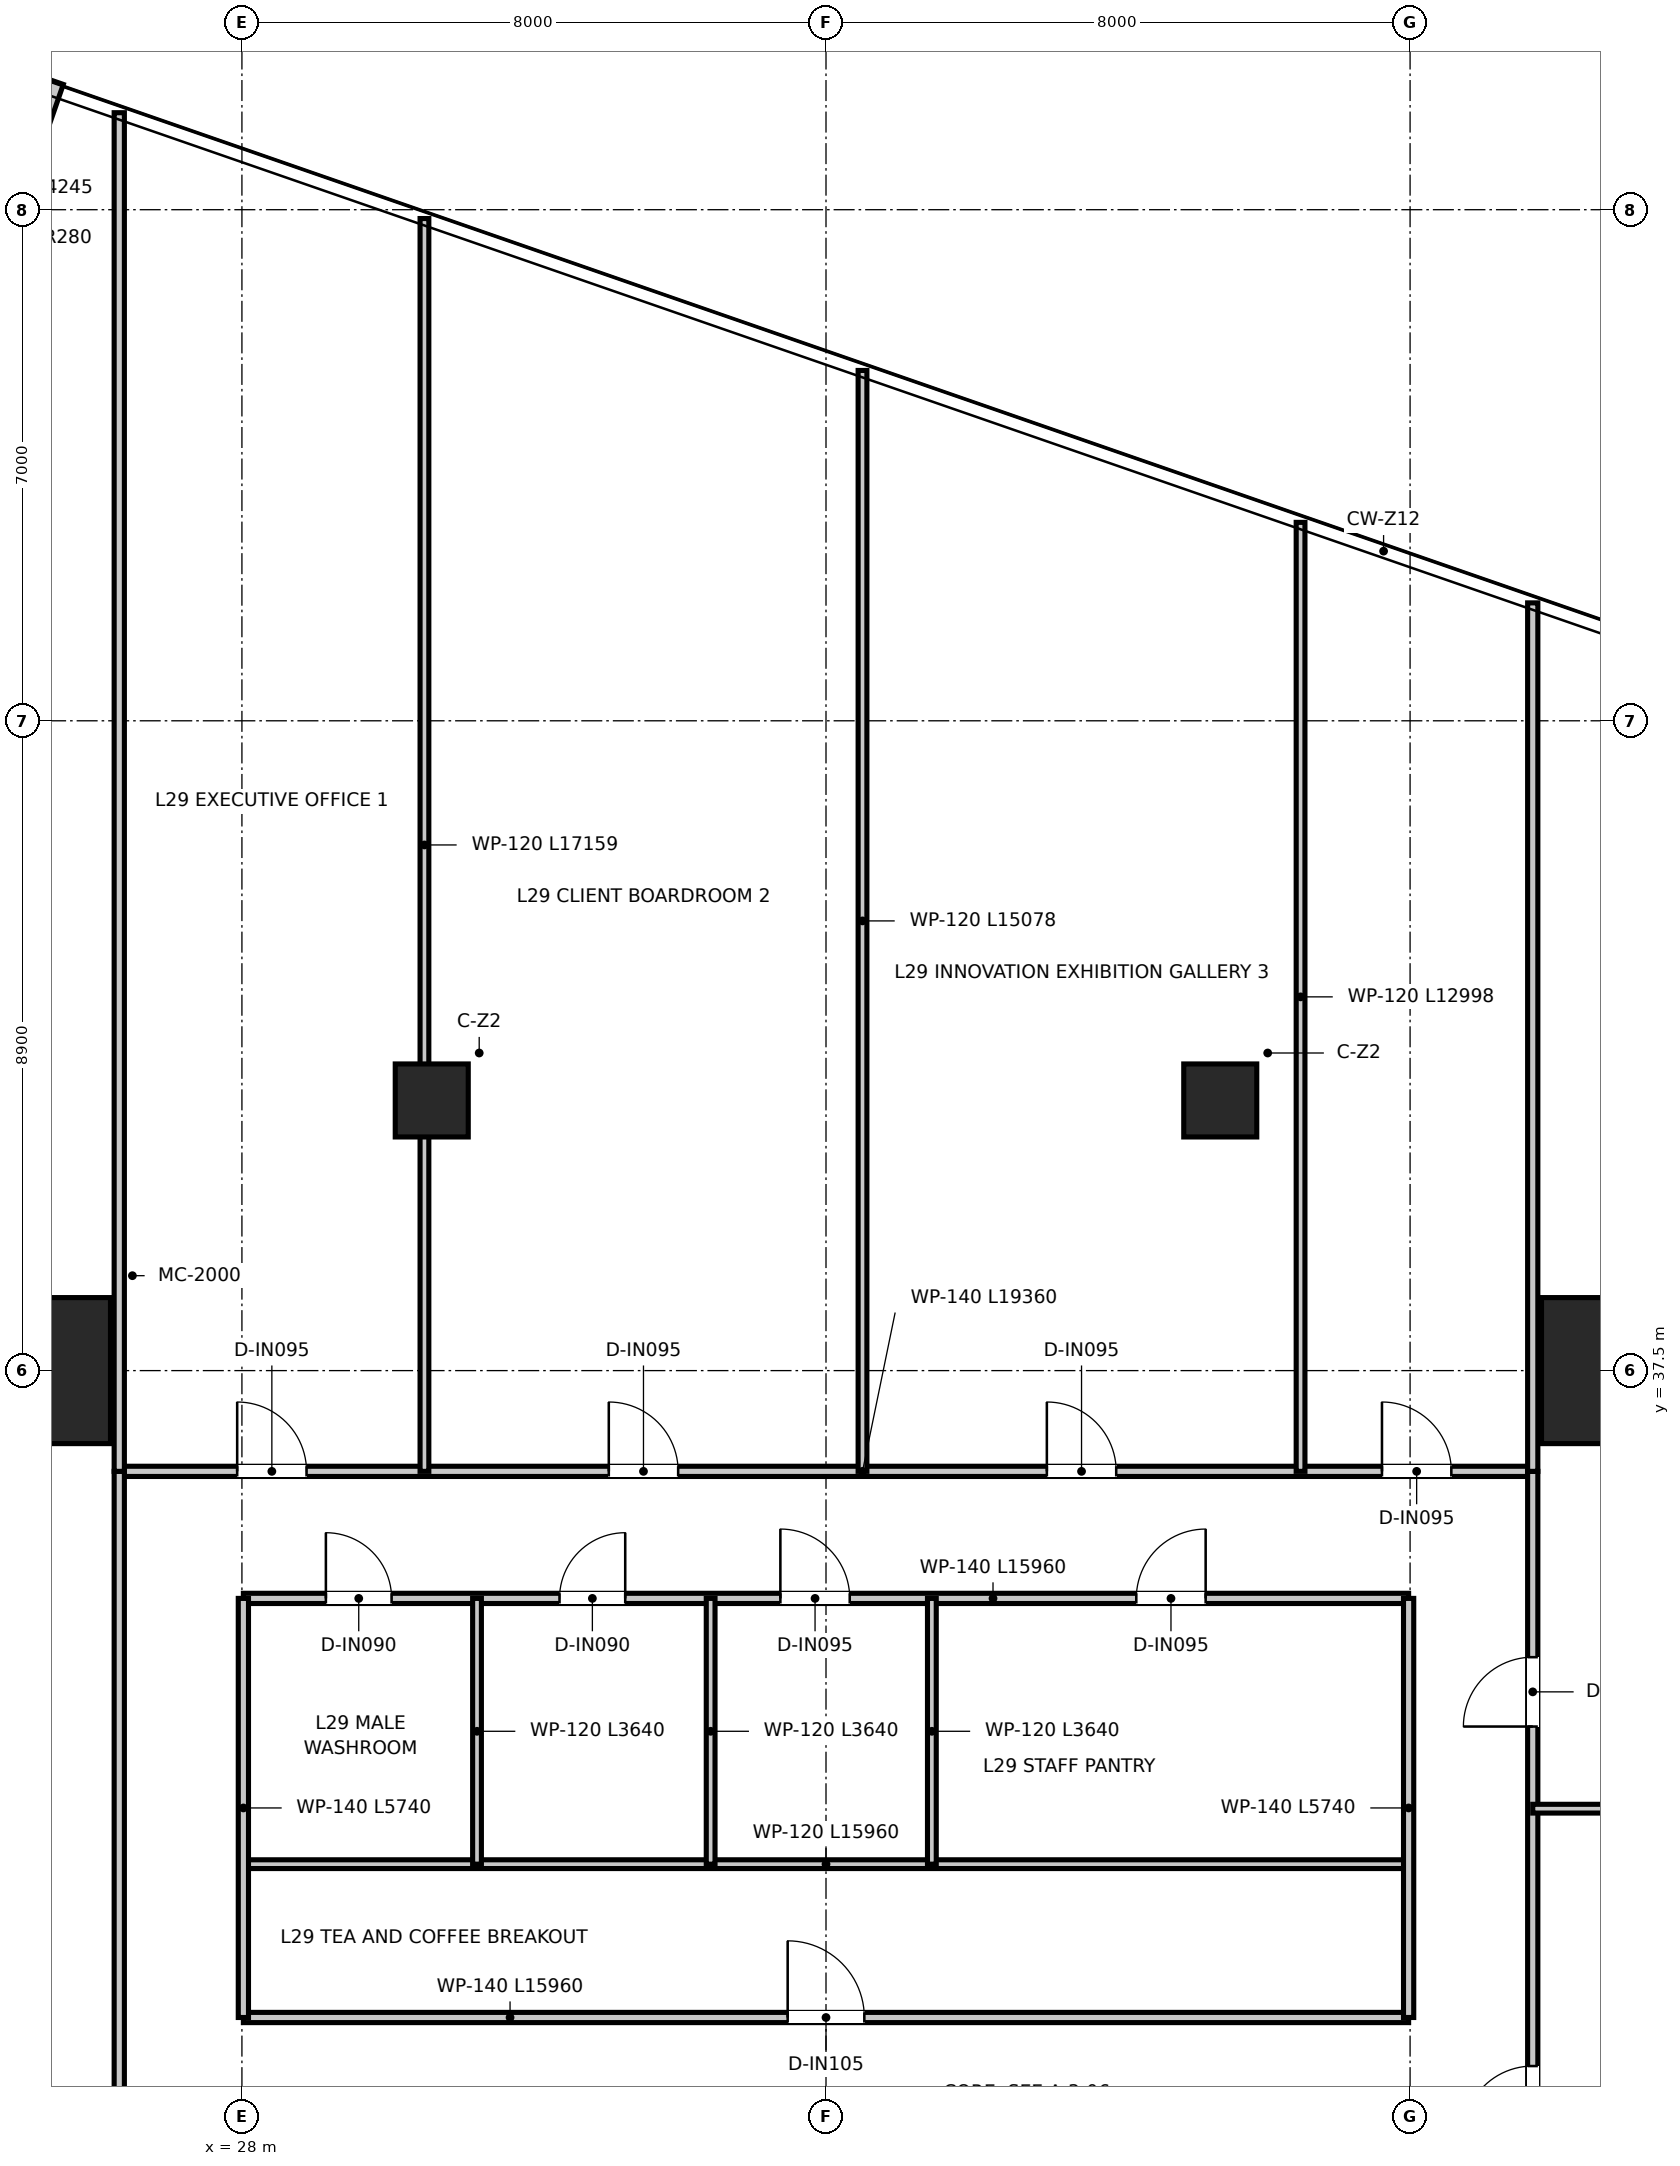
"""IFC4 building model, lengths in metres.
Left out: names, types, materials, properties, quantities, classifications, styles, units other than length and angle.
Written with IfcOpenShell. Run it as: python <this file> out.ifc"""

import sys

from ifc_helpers import new_model, si_unit, direction, frame, frame_2d, origin, origin_2d, place, context, subcontext, project, spatial, rectangle, extrude, source, transform, mapped, element, fill, save


model = new_model("IFC4")
c1 = context("Model", 3, precision=1e-05, world=origin(), true_north=direction((0.0, 1.0)))
c2 = subcontext(c1, "Body", "Model", "MODEL_VIEW")
j1 = project(units=[si_unit("LENGTHUNIT", "METRE"), si_unit("PLANEANGLEUNIT", "RADIAN")], contexts=[c1])
p1 = place(None, origin())
s1 = spatial("IfcSite", under=j1, at=p1, CompositionType="ELEMENT")
p2 = place(p1, origin())
s2 = spatial("IfcBuilding", under=s1, at=p2, CompositionType="ELEMENT")
p3 = place(p2, frame((0.0, 0.0, 121.65)))
s3 = spatial("IfcBuildingStorey", under=s2, at=p3, CompositionType="ELEMENT", Elevation=121.65)
m1 = source(origin(), c2, "Body", "SweptSolid", [
    extrude(rectangle(XDim=2.0, YDim=2.0, at=origin_2d()), origin(), (0.0, 0.0, 1.0), 3.95),
])
for number, where, z_axis, x_axis in (
    (1, (46.8, 37.5, 0.0), (0.0, 0.0, 1.0), (1.0, 0.0, 0.0)),
    (2, (25.2, 37.5, 0.0), (0.0, 0.0, 1.0), (1.0, 0.0, 0.0)),
):
    element("IfcColumn", number, at=place(p3, frame(where, z_axis=z_axis, x_axis=x_axis)), inside=s3, PredefinedType="USERDEFINED", context=c2, shape_type="MappedRepresentation", body=[
        mapped(m1, transform((0.0, 0.0, 0.0), x_axis=(1.0, 0.0, 0.0), y_axis=(0.0, 1.0, 0.0), z_axis=(0.0, 0.0, 1.0), scale=1.0)),
    ])
m2 = source(origin(), c2, "Body", "SweptSolid", [
    extrude(rectangle(XDim=1.0, YDim=1.0, at=origin_2d()), origin(), (0.0, 0.0, 1.0), 3.95),
])
for number, where, z_axis, x_axis in (
    (3, (30.6, 41.2, 0.0), (0.0, 0.0, 1.0), (1.0, 0.0, 0.0)),
    (4, (41.4, 41.2, 0.0), (0.0, 0.0, 1.0), (1.0, 0.0, 0.0)),
):
    element("IfcColumn", number, at=place(p3, frame(where, z_axis=z_axis, x_axis=x_axis)), inside=s3, PredefinedType="COLUMN", context=c2, shape_type="MappedRepresentation", body=[
        mapped(m2, transform((0.0, 0.0, 0.0), x_axis=(1.0, 0.0, 0.0), y_axis=(0.0, 1.0, 0.0), z_axis=(0.0, 0.0, 1.0), scale=1.0)),
    ])
p4 = place(p3, frame((25.449, 55.152, 0.0), z_axis=(0.0, 0.0, 1.0), x_axis=(-0.327643843028, -0.944801308279, 0.0)))
e5 = element("IfcWall", 5, at=p4, inside=s3, PredefinedType="ELEMENTEDWALL", context=c2, shape_type="SweptSolid", body=[
    extrude(rectangle(XDim=4.245, YDim=0.22, at=frame_2d((2.123, 0.0))), origin(), (0.0, 0.0, 1.0), 3.67),
])
p5 = place(p3, frame((28.02, 28.64, 0.0), z_axis=(0.0, 0.0, 1.0), x_axis=(1.0, 0.0, 0.0)))
e6 = element("IfcWall", 6, at=p5, inside=s3, PredefinedType="PARTITIONING", context=c2, shape_type="SweptSolid", body=[
    extrude(rectangle(XDim=15.96, YDim=0.14, at=frame_2d((7.98, 0.0))), origin(), (0.0, 0.0, 1.0), 3.08),
])
p6 = place(p5, frame((7.455, 0.0, 0.0)))
e7 = element("IfcOpeningElement", 7, at=p6, cuts=e6, PredefinedType="OPENING", context=c2, shape_type="SweptSolid", body=[
    extrude(rectangle(XDim=1.05, YDim=2.15, at=frame_2d((0.525, 1.075))), frame((0.0, 0.08, 0.0), z_axis=(0.0, -1.0, 0.0), x_axis=(1.0, 0.0, 0.0)), (0.0, 0.0, 1.0), 0.16),
])
p7 = place(p3, frame((28.02, 30.74, 0.0), z_axis=(0.0, 0.0, 1.0), x_axis=(1.0, 0.0, 0.0)))
e8 = element("IfcWall", 8, at=p7, inside=s3, PredefinedType="PARTITIONING", context=c2, shape_type="SweptSolid", body=[
    extrude(rectangle(XDim=15.96, YDim=0.12, at=frame_2d((7.98, 0.0))), origin(), (0.0, 0.0, 1.0), 3.08),
])
p8 = place(p3, frame((28.02, 34.38, 0.0), z_axis=(0.0, 0.0, 1.0), x_axis=(1.0, 0.0, 0.0)))
e9 = element("IfcWall", 9, at=p8, inside=s3, PredefinedType="PARTITIONING", context=c2, shape_type="SweptSolid", body=[
    extrude(rectangle(XDim=15.96, YDim=0.14, at=frame_2d((7.98, 0.0))), origin(), (0.0, 0.0, 1.0), 3.08),
])
p9 = place(p8, frame((1.13, 0.0, 0.0)))
e10 = element("IfcOpeningElement", 10, at=p9, cuts=e9, PredefinedType="OPENING", context=c2, shape_type="SweptSolid", body=[
    extrude(rectangle(XDim=0.9, YDim=2.1, at=frame_2d((0.45, 1.05))), frame((0.0, 0.08, 0.0), z_axis=(0.0, -1.0, 0.0), x_axis=(1.0, 0.0, 0.0)), (0.0, 0.0, 1.0), 0.16),
])
p10 = place(p8, frame((4.33, 0.0, 0.0)))
e11 = element("IfcOpeningElement", 11, at=p10, cuts=e9, PredefinedType="OPENING", context=c2, shape_type="SweptSolid", body=[
    extrude(rectangle(XDim=0.9, YDim=2.1, at=frame_2d((0.45, 1.05))), frame((0.0, 0.08, 0.0), z_axis=(0.0, -1.0, 0.0), x_axis=(1.0, 0.0, 0.0)), (0.0, 0.0, 1.0), 0.16),
])
p11 = place(p8, frame((7.355, 0.0, 0.0)))
e12 = element("IfcOpeningElement", 12, at=p11, cuts=e9, PredefinedType="OPENING", context=c2, shape_type="SweptSolid", body=[
    extrude(rectangle(XDim=0.95, YDim=2.1, at=frame_2d((0.475, 1.05))), frame((0.0, 0.08, 0.0), z_axis=(0.0, -1.0, 0.0), x_axis=(1.0, 0.0, 0.0)), (0.0, 0.0, 1.0), 0.16),
])
p12 = place(p8, frame((12.23, 0.0, 0.0)))
e13 = element("IfcOpeningElement", 13, at=p12, cuts=e9, PredefinedType="OPENING", context=c2, shape_type="SweptSolid", body=[
    extrude(rectangle(XDim=0.95, YDim=2.1, at=frame_2d((0.475, 1.05))), frame((0.0, 0.08, 0.0), z_axis=(0.0, -1.0, 0.0), x_axis=(1.0, 0.0, 0.0)), (0.0, 0.0, 1.0), 0.16),
])
for number, where, z_axis, x_axis in (
    (14, (28.02, 28.64, 0.0), (0.0, 0.0, 1.0), (0.0, 1.0, 0.0)),
    (15, (43.98, 28.64, 0.0), (0.0, 0.0, 1.0), (0.0, 1.0, 0.0)),
):
    element("IfcWall", number, at=place(p3, frame(where, z_axis=z_axis, x_axis=x_axis)), inside=s3, PredefinedType="PARTITIONING", context=c2, shape_type="SweptSolid", body=[
        extrude(rectangle(XDim=5.74, YDim=0.14, at=frame_2d((2.87, 0.0))), origin(), (0.0, 0.0, 1.0), 3.27),
    ])
for number, where, z_axis, x_axis in (
    (16, (31.22, 30.74, 0.0), (0.0, 0.0, 1.0), (0.0, 1.0, 0.0)),
    (17, (34.42, 30.74, 0.0), (0.0, 0.0, 1.0), (0.0, 1.0, 0.0)),
    (18, (37.45, 30.74, 0.0), (0.0, 0.0, 1.0), (0.0, 1.0, 0.0)),
):
    element("IfcWall", number, at=place(p3, frame(where, z_axis=z_axis, x_axis=x_axis)), inside=s3, PredefinedType="PARTITIONING", context=c2, shape_type="SweptSolid", body=[
        extrude(rectangle(XDim=3.64, YDim=0.12, at=frame_2d((1.82, 0.0))), origin(), (0.0, 0.0, 1.0), 3.17),
    ])
p13 = place(p3, frame((26.32, 36.12, 0.0), z_axis=(0.0, 0.0, 1.0), x_axis=(1.0, 0.0, 0.0)))
e19 = element("IfcWall", 19, at=p13, inside=s3, PredefinedType="PARTITIONING", context=c2, shape_type="SweptSolid", body=[
    extrude(rectangle(XDim=19.36, YDim=0.14, at=frame_2d((9.68, 0.0))), origin(), (0.0, 0.0, 1.0), 3.08),
])
p14 = place(p13, frame((1.615, 0.0, 0.0)))
e20 = element("IfcOpeningElement", 20, at=p14, cuts=e19, PredefinedType="OPENING", context=c2, shape_type="SweptSolid", body=[
    extrude(rectangle(XDim=0.95, YDim=2.1, at=frame_2d((0.475, 1.05))), frame((0.0, 0.08, 0.0), z_axis=(0.0, -1.0, 0.0), x_axis=(1.0, 0.0, 0.0)), (0.0, 0.0, 1.0), 0.16),
])
p15 = place(p13, frame((6.705, 0.0, 0.0)))
e21 = element("IfcOpeningElement", 21, at=p15, cuts=e19, PredefinedType="OPENING", context=c2, shape_type="SweptSolid", body=[
    extrude(rectangle(XDim=0.95, YDim=2.1, at=frame_2d((0.475, 1.05))), frame((0.0, 0.08, 0.0), z_axis=(0.0, -1.0, 0.0), x_axis=(1.0, 0.0, 0.0)), (0.0, 0.0, 1.0), 0.16),
])
p16 = place(p13, frame((12.705, 0.0, 0.0)))
e22 = element("IfcOpeningElement", 22, at=p16, cuts=e19, PredefinedType="OPENING", context=c2, shape_type="SweptSolid", body=[
    extrude(rectangle(XDim=0.95, YDim=2.1, at=frame_2d((0.475, 1.05))), frame((0.0, 0.08, 0.0), z_axis=(0.0, -1.0, 0.0), x_axis=(1.0, 0.0, 0.0)), (0.0, 0.0, 1.0), 0.16),
])
p17 = place(p13, frame((17.295, 0.0, 0.0)))
e23 = element("IfcOpeningElement", 23, at=p17, cuts=e19, PredefinedType="OPENING", context=c2, shape_type="SweptSolid", body=[
    extrude(rectangle(XDim=0.95, YDim=2.1, at=frame_2d((0.475, 1.05))), frame((0.0, 0.08, 0.0), z_axis=(0.0, -1.0, 0.0), x_axis=(1.0, 0.0, 0.0)), (0.0, 0.0, 1.0), 0.16),
])
p18 = place(p3, frame((26.32, 10.5, 0.0), z_axis=(0.0, 0.0, 1.0), x_axis=(0.0, 1.0, 0.0)))
e24 = element("IfcWall", 24, at=p18, inside=s3, PredefinedType="PARTITIONING", context=c2, shape_type="SweptSolid", body=[
    extrude(rectangle(XDim=25.62, YDim=0.14, at=frame_2d((12.81, 0.0))), origin(), (0.0, 0.0, 1.0), 2.97),
])
p19 = place(p18, frame((15.125, 0.0, 0.0)))
e25 = element("IfcOpeningElement", 25, at=p19, cuts=e24, PredefinedType="OPENING", context=c2, shape_type="SweptSolid", body=[
    extrude(rectangle(XDim=0.95, YDim=2.1, at=frame_2d((0.475, 1.05))), frame((0.0, 0.08, 0.0), z_axis=(0.0, -1.0, 0.0), x_axis=(1.0, 0.0, 0.0)), (0.0, 0.0, 1.0), 0.16),
])
p20 = place(p3, frame((45.68, 10.5, 0.0), z_axis=(0.0, 0.0, 1.0), x_axis=(0.0, 1.0, 0.0)))
e26 = element("IfcWall", 26, at=p20, inside=s3, PredefinedType="PARTITIONING", context=c2, shape_type="SweptSolid", body=[
    extrude(rectangle(XDim=25.62, YDim=0.14, at=frame_2d((12.81, 0.0))), origin(), (0.0, 0.0, 1.0), 2.97),
])
p21 = place(p20, frame((9.525, 0.0, 0.0)))
e27 = element("IfcOpeningElement", 27, at=p21, cuts=e26, PredefinedType="OPENING", context=c2, shape_type="SweptSolid", body=[
    extrude(rectangle(XDim=0.95, YDim=2.1, at=frame_2d((0.475, 1.05))), frame((0.0, 0.08, 0.0), z_axis=(0.0, -1.0, 0.0), x_axis=(1.0, 0.0, 0.0)), (0.0, 0.0, 1.0), 0.16),
])
p22 = place(p20, frame((16.525, 0.0, 0.0)))
e28 = element("IfcOpeningElement", 28, at=p22, cuts=e26, PredefinedType="OPENING", context=c2, shape_type="SweptSolid", body=[
    extrude(rectangle(XDim=0.95, YDim=2.1, at=frame_2d((0.475, 1.05))), frame((0.0, 0.08, 0.0), z_axis=(0.0, -1.0, 0.0), x_axis=(1.0, 0.0, 0.0)), (0.0, 0.0, 1.0), 0.16),
])
p23 = place(p20, frame((22.125, 0.0, 0.0)))
e29 = element("IfcOpeningElement", 29, at=p23, cuts=e26, PredefinedType="OPENING", context=c2, shape_type="SweptSolid", body=[
    extrude(rectangle(XDim=0.95, YDim=2.1, at=frame_2d((0.475, 1.05))), frame((0.0, 0.08, 0.0), z_axis=(0.0, -1.0, 0.0), x_axis=(1.0, 0.0, 0.0)), (0.0, 0.0, 1.0), 0.16),
])
p24 = place(p3, frame((26.32, 36.12, 0.0), z_axis=(0.0, 0.0, 1.0), x_axis=(0.0, 1.0, 0.0)))
e30 = element("IfcWall", 30, at=p24, inside=s3, PredefinedType="PARTITIONING", context=c2, shape_type="SweptSolid", body=[
    extrude(rectangle(XDim=18.608, YDim=0.14, at=frame_2d((9.304, 0.0))), origin(), (0.0, 0.0, 1.0), 2.97),
])
p25 = place(p3, frame((45.68, 36.12, 0.0), z_axis=(0.0, 0.0, 1.0), x_axis=(0.0, 1.0, 0.0)))
e31 = element("IfcWall", 31, at=p25, inside=s3, PredefinedType="PARTITIONING", context=c2, shape_type="SweptSolid", body=[
    extrude(rectangle(XDim=11.895, YDim=0.14, at=frame_2d((5.947, 0.0))), origin(), (0.0, 0.0, 1.0), 2.97),
])
p26 = place(p3, frame((30.5, 36.12, 0.0), z_axis=(0.0, 0.0, 1.0), x_axis=(0.0, 1.0, 0.0)))
e32 = element("IfcWall", 32, at=p26, inside=s3, PredefinedType="PARTITIONING", context=c2, shape_type="SweptSolid", body=[
    extrude(rectangle(XDim=17.159, YDim=0.12, at=frame_2d((8.58, 0.0))), origin(), (0.0, 0.0, 1.0), 2.97),
])
p27 = place(p3, frame((36.5, 36.12, 0.0), z_axis=(0.0, 0.0, 1.0), x_axis=(0.0, 1.0, 0.0)))
e33 = element("IfcWall", 33, at=p27, inside=s3, PredefinedType="PARTITIONING", context=c2, shape_type="SweptSolid", body=[
    extrude(rectangle(XDim=15.078, YDim=0.12, at=frame_2d((7.539, 0.0))), origin(), (0.0, 0.0, 1.0), 2.97),
])
p28 = place(p3, frame((42.5, 36.12, 0.0), z_axis=(0.0, 0.0, 1.0), x_axis=(0.0, 1.0, 0.0)))
e34 = element("IfcWall", 34, at=p28, inside=s3, PredefinedType="PARTITIONING", context=c2, shape_type="SweptSolid", body=[
    extrude(rectangle(XDim=12.998, YDim=0.12, at=frame_2d((6.499, 0.0))), origin(), (0.0, 0.0, 1.0), 2.97),
])
p29 = place(p3, frame((45.68, 31.5, 0.0), z_axis=(0.0, 0.0, 1.0), x_axis=(1.0, 0.0, 0.0)))
e35 = element("IfcWall", 35, at=p29, inside=s3, PredefinedType="PARTITIONING", context=c2, shape_type="SweptSolid", body=[
    extrude(rectangle(XDim=16.656, YDim=0.12, at=frame_2d((8.328, 0.0))), origin(), (0.0, 0.0, 1.0), 2.97),
])
p30 = place(p6, origin())
e36 = element("IfcDoor", 36, at=p30, inside=s3, OperationType="SINGLE_SWING_LEFT", PredefinedType="DOOR", context=c2, shape_type="SweptSolid", body=[
    extrude(rectangle(XDim=1.05, YDim=2.15, at=frame_2d((0.525, 1.075))), frame((0.0, 0.025, 0.0), z_axis=(0.0, -1.0, 0.0), x_axis=(1.0, 0.0, 0.0)), (0.0, 0.0, 1.0), 0.05),
])
fill(e7, e36)
p31 = place(p9, origin())
e37 = element("IfcDoor", 37, at=p31, inside=s3, OperationType="SINGLE_SWING_LEFT", PredefinedType="DOOR", context=c2, shape_type="SweptSolid", body=[
    extrude(rectangle(XDim=0.9, YDim=2.1, at=frame_2d((0.45, 1.05))), frame((0.0, 0.025, 0.0), z_axis=(0.0, -1.0, 0.0), x_axis=(1.0, 0.0, 0.0)), (0.0, 0.0, 1.0), 0.05),
])
fill(e10, e37)
p32 = place(p10, origin())
e38 = element("IfcDoor", 38, at=p32, inside=s3, OperationType="SINGLE_SWING_RIGHT", PredefinedType="DOOR", context=c2, shape_type="SweptSolid", body=[
    extrude(rectangle(XDim=0.9, YDim=2.1, at=frame_2d((0.45, 1.05))), frame((0.0, 0.025, 0.0), z_axis=(0.0, -1.0, 0.0), x_axis=(1.0, 0.0, 0.0)), (0.0, 0.0, 1.0), 0.05),
])
fill(e11, e38)
p33 = place(p11, origin())
e39 = element("IfcDoor", 39, at=p33, inside=s3, OperationType="SINGLE_SWING_LEFT", PredefinedType="DOOR", context=c2, shape_type="SweptSolid", body=[
    extrude(rectangle(XDim=0.95, YDim=2.1, at=frame_2d((0.475, 1.05))), frame((0.0, 0.025, 0.0), z_axis=(0.0, -1.0, 0.0), x_axis=(1.0, 0.0, 0.0)), (0.0, 0.0, 1.0), 0.05),
])
fill(e12, e39)
p34 = place(p12, origin())
e40 = element("IfcDoor", 40, at=p34, inside=s3, OperationType="SINGLE_SWING_RIGHT", PredefinedType="DOOR", context=c2, shape_type="SweptSolid", body=[
    extrude(rectangle(XDim=0.95, YDim=2.1, at=frame_2d((0.475, 1.05))), frame((0.0, 0.025, 0.0), z_axis=(0.0, -1.0, 0.0), x_axis=(1.0, 0.0, 0.0)), (0.0, 0.0, 1.0), 0.05),
])
fill(e13, e40)
p35 = place(p14, origin())
e41 = element("IfcDoor", 41, at=p35, inside=s3, OperationType="SINGLE_SWING_LEFT", PredefinedType="DOOR", context=c2, shape_type="SweptSolid", body=[
    extrude(rectangle(XDim=0.95, YDim=2.1, at=frame_2d((0.475, 1.05))), frame((0.0, 0.025, 0.0), z_axis=(0.0, -1.0, 0.0), x_axis=(1.0, 0.0, 0.0)), (0.0, 0.0, 1.0), 0.05),
])
fill(e20, e41)
p36 = place(p15, origin())
e42 = element("IfcDoor", 42, at=p36, inside=s3, OperationType="SINGLE_SWING_LEFT", PredefinedType="DOOR", context=c2, shape_type="SweptSolid", body=[
    extrude(rectangle(XDim=0.95, YDim=2.1, at=frame_2d((0.475, 1.05))), frame((0.0, 0.025, 0.0), z_axis=(0.0, -1.0, 0.0), x_axis=(1.0, 0.0, 0.0)), (0.0, 0.0, 1.0), 0.05),
])
fill(e21, e42)
p37 = place(p16, origin())
e43 = element("IfcDoor", 43, at=p37, inside=s3, OperationType="SINGLE_SWING_LEFT", PredefinedType="DOOR", context=c2, shape_type="SweptSolid", body=[
    extrude(rectangle(XDim=0.95, YDim=2.1, at=frame_2d((0.475, 1.05))), frame((0.0, 0.025, 0.0), z_axis=(0.0, -1.0, 0.0), x_axis=(1.0, 0.0, 0.0)), (0.0, 0.0, 1.0), 0.05),
])
fill(e22, e43)
p38 = place(p17, origin())
e44 = element("IfcDoor", 44, at=p38, inside=s3, OperationType="SINGLE_SWING_LEFT", PredefinedType="DOOR", context=c2, shape_type="SweptSolid", body=[
    extrude(rectangle(XDim=0.95, YDim=2.1, at=frame_2d((0.475, 1.05))), frame((0.0, 0.025, 0.0), z_axis=(0.0, -1.0, 0.0), x_axis=(1.0, 0.0, 0.0)), (0.0, 0.0, 1.0), 0.05),
])
fill(e23, e44)
p39 = place(p22, origin())
e45 = element("IfcDoor", 45, at=p39, inside=s3, OperationType="SINGLE_SWING_LEFT", PredefinedType="DOOR", context=c2, shape_type="SweptSolid", body=[
    extrude(rectangle(XDim=0.95, YDim=2.1, at=frame_2d((0.475, 1.05))), frame((0.0, 0.025, 0.0), z_axis=(0.0, -1.0, 0.0), x_axis=(1.0, 0.0, 0.0)), (0.0, 0.0, 1.0), 0.05),
])
fill(e28, e45)
p40 = place(p23, origin())
e46 = element("IfcDoor", 46, at=p40, inside=s3, OperationType="SINGLE_SWING_LEFT", PredefinedType="DOOR", context=c2, shape_type="SweptSolid", body=[
    extrude(rectangle(XDim=0.95, YDim=2.1, at=frame_2d((0.475, 1.05))), frame((0.0, 0.025, 0.0), z_axis=(0.0, -1.0, 0.0), x_axis=(1.0, 0.0, 0.0)), (0.0, 0.0, 1.0), 0.05),
])
fill(e29, e46)
save(model, sys.argv[1])
